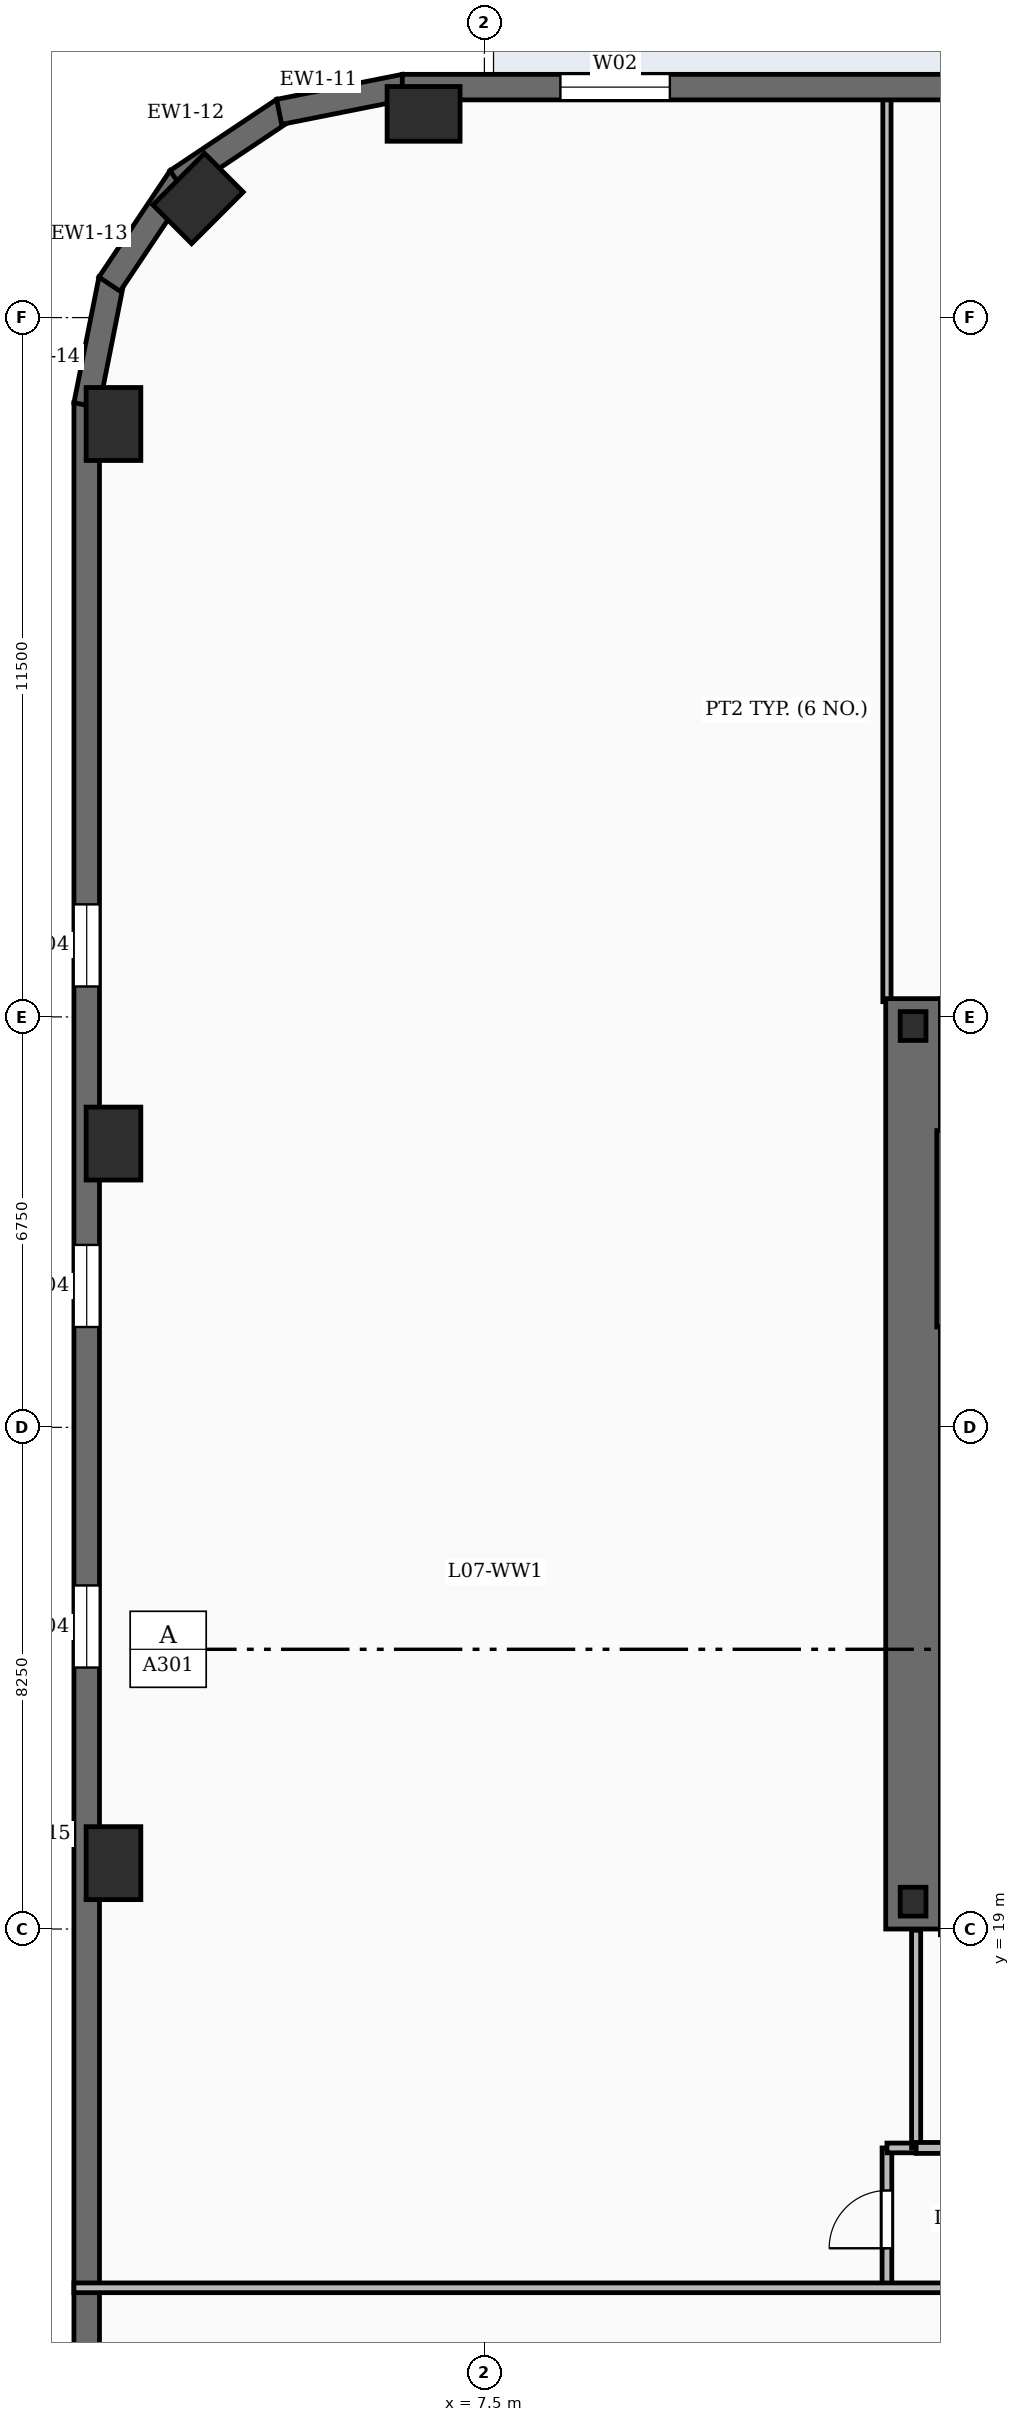
"""IFC4 building model, lengths in metres.
Left out: names, types, materials, properties, quantities, classifications, styles, units other than length and angle.
Written with IfcOpenShell. Run it as: python <this file> out.ifc"""

import sys

from ifc_helpers import new_model, si_unit, direction, frame, frame_2d, origin, origin_2d, place, context, subcontext, project, spatial, rectangle, i_section, extrude, element, fill, save


model = new_model("IFC4")
c1 = context("Model", 3, precision=1e-05, world=origin(), true_north=direction((0.0, 1.0)))
c2 = subcontext(c1, "Body", "Model", "MODEL_VIEW")
j1 = project(units=[si_unit("LENGTHUNIT", "METRE"), si_unit("PLANEANGLEUNIT", "RADIAN")], contexts=[c1])
p1 = place(None, origin())
s1 = spatial("IfcSite", under=j1, at=p1, CompositionType="ELEMENT")
p2 = place(p1, origin())
s2 = spatial("IfcBuilding", under=s1, at=p2, CompositionType="ELEMENT")
p3 = place(p2, frame((0.0, 0.0, 42.0)))
s3 = spatial("IfcBuildingStorey", under=s2, at=p3, CompositionType="ELEMENT", Elevation=42.0)
p4 = place(p3, frame((14.55, 19.0, -0.45), z_axis=(0.0, 0.0, 1.0), x_axis=(0.0, 1.0, 0.0)))
e1 = element("IfcWall", 1, at=p4, inside=s3, PredefinedType="SHEAR", context=c2, shape_type="SweptSolid", body=[
    extrude(rectangle(XDim=15.3, YDim=0.9, at=frame_2d((7.65, 0.0))), origin(), (0.0, 0.0, 1.0), 3.93),
])
for number, where, z_axis, x_axis in (
    (2, (14.55, 19.45, -0.45), (0.0, 0.0, 1.0), (1.0, 0.0, 0.0)),
    (3, (14.55, 33.85, -0.45), (0.0, 0.0, 1.0), (1.0, 0.0, 0.0)),
):
    element("IfcColumn", number, at=place(p3, frame(where, z_axis=z_axis, x_axis=x_axis)), inside=s3, PredefinedType="COLUMN", context=c2, shape_type="SweptSolid", body=[
        extrude(i_section(OverallWidth=0.424, OverallDepth=0.474, WebThickness=0.048, FlangeThickness=0.077, FilletRadius=0.02, at=origin_2d()), origin(), (0.0, 0.0, 1.0), 3.93),
    ])
for number, where, z_axis, x_axis in (
    (4, (6.5, 48.85, -0.45), (0.0, 0.0, 1.0), (1.0, 0.0, 0.0)),
    (5, (2.791, 47.459, -0.45), (0.0, 0.0, 1.0), (0.707, 0.707, 0.0)),
    (6, (1.4, 43.75, -0.45), (0.0, 0.0, 1.0), (0.0, 1.0, 0.0)),
    (7, (1.4, 31.917, -0.45), (0.0, 0.0, 1.0), (0.0, 1.0, 0.0)),
    (8, (1.4, 20.083, -0.45), (0.0, 0.0, 1.0), (0.0, 1.0, 0.0)),
):
    element("IfcColumn", number, at=place(p3, frame(where, z_axis=z_axis, x_axis=x_axis)), inside=s3, PredefinedType="COLUMN", context=c2, shape_type="SweptSolid", body=[
        extrude(rectangle(XDim=1.2, YDim=0.9, at=origin_2d()), origin(), (0.0, 0.0, 1.0), 3.93),
    ])
p5 = place(p3, frame((6.15, 49.29, 0.0), z_axis=(0.0, 0.0, 1.0), x_axis=(1.0, 0.0, 0.0)))
e9 = element("IfcWall", 9, at=p5, inside=s3, PredefinedType="SOLIDWALL", context=c2, shape_type="SweptSolid", body=[
    extrude(rectangle(XDim=61.7, YDim=0.42, at=frame_2d((30.85, 0.0))), origin(), (0.0, 0.0, 1.0), 3.48),
])
p6 = place(p5, frame((2.6, 0.0, 0.88)))
e10 = element("IfcOpeningElement", 10, at=p6, cuts=e9, PredefinedType="OPENING", context=c2, shape_type="SweptSolid", body=[
    extrude(rectangle(XDim=1.8, YDim=2.15, at=frame_2d((0.9, 1.075))), frame((0.0, 0.22, 0.0), z_axis=(0.0, -1.0, 0.0), x_axis=(1.0, 0.0, 0.0)), (0.0, 0.0, 1.0), 0.44),
])
p7 = place(p5, frame((18.8, 0.0, 0.88)))
e11 = element("IfcOpeningElement", 11, at=p7, cuts=e9, PredefinedType="OPENING", context=c2, shape_type="SweptSolid", body=[
    extrude(rectangle(XDim=1.8, YDim=2.15, at=frame_2d((0.9, 1.075))), frame((0.0, 0.22, 0.0), z_axis=(0.0, -1.0, 0.0), x_axis=(1.0, 0.0, 0.0)), (0.0, 0.0, 1.0), 0.44),
])
p8 = place(p5, frame((35.0, 0.0, 0.88)))
e12 = element("IfcOpeningElement", 12, at=p8, cuts=e9, PredefinedType="OPENING", context=c2, shape_type="SweptSolid", body=[
    extrude(rectangle(XDim=1.8, YDim=2.15, at=frame_2d((0.9, 1.075))), frame((0.0, 0.22, 0.0), z_axis=(0.0, -1.0, 0.0), x_axis=(1.0, 0.0, 0.0)), (0.0, 0.0, 1.0), 0.44),
])
p9 = place(p5, frame((40.4, 0.0, 0.88)))
e13 = element("IfcOpeningElement", 13, at=p9, cuts=e9, PredefinedType="OPENING", context=c2, shape_type="SweptSolid", body=[
    extrude(rectangle(XDim=1.8, YDim=2.15, at=frame_2d((0.9, 1.075))), frame((0.0, 0.22, 0.0), z_axis=(0.0, -1.0, 0.0), x_axis=(1.0, 0.0, 0.0)), (0.0, 0.0, 1.0), 0.44),
])
p10 = place(p5, frame((51.2, 0.0, 0.88)))
e14 = element("IfcOpeningElement", 14, at=p10, cuts=e9, PredefinedType="OPENING", context=c2, shape_type="SweptSolid", body=[
    extrude(rectangle(XDim=1.8, YDim=2.15, at=frame_2d((0.9, 1.075))), frame((0.0, 0.22, 0.0), z_axis=(0.0, -1.0, 0.0), x_axis=(1.0, 0.0, 0.0)), (0.0, 0.0, 1.0), 0.44),
])
p11 = place(p5, frame((56.6, 0.0, 0.88)))
e15 = element("IfcOpeningElement", 15, at=p11, cuts=e9, PredefinedType="OPENING", context=c2, shape_type="SweptSolid", body=[
    extrude(rectangle(XDim=1.8, YDim=2.15, at=frame_2d((0.9, 1.075))), frame((0.0, 0.22, 0.0), z_axis=(0.0, -1.0, 0.0), x_axis=(1.0, 0.0, 0.0)), (0.0, 0.0, 1.0), 0.44),
])
for number, where, z_axis, x_axis in (
    (16, (4.125, 48.883, 0.0), (0.0, 0.0, 1.0), (0.981, 0.195, 0.0)),
    (17, (2.448, 47.744, 0.0), (0.0, 0.0, 1.0), (0.832, 0.556, 0.0)),
    (18, (1.336, 46.05, 0.0), (0.0, 0.0, 1.0), (0.556, 0.832, 0.0)),
    (19, (0.956, 44.059, 0.0), (0.0, 0.0, 1.0), (0.195, 0.981, 0.0)),
):
    element("IfcWall", number, at=place(p3, frame(where, z_axis=z_axis, x_axis=x_axis)), inside=s3, PredefinedType="SOLIDWALL", context=c2, shape_type="SweptSolid", body=[
        extrude(rectangle(XDim=2.107, YDim=0.42, at=frame_2d((1.053, 0.0))), origin(), (0.0, 0.0, 1.0), 3.48),
    ])
p12 = place(p3, frame((0.96, 7.9, 0.0), z_axis=(0.0, 0.0, 1.0), x_axis=(0.0, 1.0, 0.0)))
e20 = element("IfcWall", 20, at=p12, inside=s3, PredefinedType="SOLIDWALL", context=c2, shape_type="SweptSolid", body=[
    extrude(rectangle(XDim=36.2, YDim=0.42, at=frame_2d((18.1, 0.0))), origin(), (0.0, 0.0, 1.0), 3.48),
])
p13 = place(p12, frame((15.4, 0.0, 0.88)))
e21 = element("IfcOpeningElement", 21, at=p13, cuts=e20, PredefinedType="OPENING", context=c2, shape_type="SweptSolid", body=[
    extrude(rectangle(XDim=1.35, YDim=2.2, at=frame_2d((0.675, 1.1))), frame((0.0, 0.22, 0.0), z_axis=(0.0, -1.0, 0.0), x_axis=(1.0, 0.0, 0.0)), (0.0, 0.0, 1.0), 0.44),
])
p14 = place(p12, frame((21.0, 0.0, 0.88)))
e22 = element("IfcOpeningElement", 22, at=p14, cuts=e20, PredefinedType="OPENING", context=c2, shape_type="SweptSolid", body=[
    extrude(rectangle(XDim=1.35, YDim=2.2, at=frame_2d((0.675, 1.1))), frame((0.0, 0.22, 0.0), z_axis=(0.0, -1.0, 0.0), x_axis=(1.0, 0.0, 0.0)), (0.0, 0.0, 1.0), 0.44),
])
p15 = place(p12, frame((26.6, 0.0, 0.88)))
e23 = element("IfcOpeningElement", 23, at=p15, cuts=e20, PredefinedType="OPENING", context=c2, shape_type="SweptSolid", body=[
    extrude(rectangle(XDim=1.35, YDim=2.2, at=frame_2d((0.675, 1.1))), frame((0.0, 0.22, 0.0), z_axis=(0.0, -1.0, 0.0), x_axis=(1.0, 0.0, 0.0)), (0.0, 0.0, 1.0), 0.44),
])
p16 = place(p3, frame((15.06, 28.9, 0.0), z_axis=(0.0, 0.0, 1.0), x_axis=(0.0, 1.0, 0.0)))
e24 = element("IfcWall", 24, at=p16, inside=s3, PredefinedType="SOLIDWALL", context=c2, shape_type="SweptSolid", body=[
    extrude(rectangle(XDim=3.23, YDim=0.24, at=frame_2d((1.615, 0.0))), origin(), (0.0, 0.0, 1.0), 3.48),
])
for number, where, z_axis, x_axis in (
    (25, (15.0, 20.905, 0.0), (0.0, 0.0, 1.0), (1.0, 0.0, 0.0)),
    (26, (15.0, 18.995, 0.0), (0.0, 0.0, 1.0), (1.0, 0.0, 0.0)),
):
    element("IfcWall", number, at=place(p3, frame(where, z_axis=z_axis, x_axis=x_axis)), inside=s3, PredefinedType="SOLIDWALL", context=c2, shape_type="SweptSolid", body=[
        extrude(rectangle(XDim=3.3, YDim=0.18, at=frame_2d((1.65, 0.0))), origin(), (0.0, 0.0, 1.0), 3.48),
    ])
p17 = place(p3, frame((14.6, 15.4, 0.0), z_axis=(0.0, 0.0, 1.0), x_axis=(1.0, 0.0, 0.0)))
e27 = element("IfcWall", 27, at=p17, inside=s3, PredefinedType="PARTITIONING", context=c2, shape_type="SweptSolid", body=[
    extrude(rectangle(XDim=9.9, YDim=0.18, at=frame_2d((4.95, 0.0))), origin(), (0.0, 0.0, 1.0), 2.54),
])
p18 = place(p17, frame((0.74, 0.0, 0.0)))
e28 = element("IfcOpeningElement", 28, at=p18, cuts=e27, PredefinedType="OPENING", context=c2, shape_type="SweptSolid", body=[
    extrude(rectangle(XDim=0.92, YDim=2.1, at=frame_2d((0.46, 1.05))), frame((0.0, 0.1, 0.0), z_axis=(0.0, -1.0, 0.0), x_axis=(1.0, 0.0, 0.0)), (0.0, 0.0, 1.0), 0.2),
])
p19 = place(p17, frame((3.19, 0.0, 0.0)))
e29 = element("IfcOpeningElement", 29, at=p19, cuts=e27, PredefinedType="OPENING", context=c2, shape_type="SweptSolid", body=[
    extrude(rectangle(XDim=0.92, YDim=2.1, at=frame_2d((0.46, 1.05))), frame((0.0, 0.1, 0.0), z_axis=(0.0, -1.0, 0.0), x_axis=(1.0, 0.0, 0.0)), (0.0, 0.0, 1.0), 0.2),
])
p20 = place(p17, frame((5.69, 0.0, 0.0)))
e30 = element("IfcOpeningElement", 30, at=p20, cuts=e27, PredefinedType="OPENING", context=c2, shape_type="SweptSolid", body=[
    extrude(rectangle(XDim=0.92, YDim=2.1, at=frame_2d((0.46, 1.05))), frame((0.0, 0.1, 0.0), z_axis=(0.0, -1.0, 0.0), x_axis=(1.0, 0.0, 0.0)), (0.0, 0.0, 1.0), 0.2),
])
p21 = place(p17, frame((8.19, 0.0, 0.0)))
e31 = element("IfcOpeningElement", 31, at=p21, cuts=e27, PredefinedType="OPENING", context=c2, shape_type="SweptSolid", body=[
    extrude(rectangle(XDim=0.92, YDim=2.1, at=frame_2d((0.46, 1.05))), frame((0.0, 0.1, 0.0), z_axis=(0.0, -1.0, 0.0), x_axis=(1.0, 0.0, 0.0)), (0.0, 0.0, 1.0), 0.2),
])
p22 = place(p3, frame((14.6, 15.4, 0.0), z_axis=(0.0, 0.0, 1.0), x_axis=(0.0, 1.0, 0.0)))
e32 = element("IfcWall", 32, at=p22, inside=s3, PredefinedType="PARTITIONING", context=c2, shape_type="SweptSolid", body=[
    extrude(rectangle(XDim=3.58, YDim=0.15, at=frame_2d((1.79, 0.0))), origin(), (0.0, 0.0, 1.0), 2.54),
])
p23 = place(p3, frame((0.75, 13.1, 0.0), z_axis=(0.0, 0.0, 1.0), x_axis=(1.0, 0.0, 0.0)))
e33 = element("IfcWall", 33, at=p23, inside=s3, PredefinedType="PARTITIONING", context=c2, shape_type="SweptSolid", body=[
    extrude(rectangle(XDim=72.5, YDim=0.16, at=frame_2d((36.25, 0.0))), origin(), (0.0, 0.0, 1.0), 2.54),
])
p24 = place(p23, frame((21.275, 0.0, 0.0)))
e34 = element("IfcOpeningElement", 34, at=p24, cuts=e33, PredefinedType="OPENING", context=c2, shape_type="SweptSolid", body=[
    extrude(rectangle(XDim=0.95, YDim=2.15, at=frame_2d((0.475, 1.075))), frame((0.0, 0.09, 0.0), z_axis=(0.0, -1.0, 0.0), x_axis=(1.0, 0.0, 0.0)), (0.0, 0.0, 1.0), 0.18),
])
p25 = place(p23, frame((36.275, 0.0, 0.0)))
e35 = element("IfcOpeningElement", 35, at=p25, cuts=e33, PredefinedType="OPENING", context=c2, shape_type="SweptSolid", body=[
    extrude(rectangle(XDim=0.95, YDim=2.15, at=frame_2d((0.475, 1.075))), frame((0.0, 0.09, 0.0), z_axis=(0.0, -1.0, 0.0), x_axis=(1.0, 0.0, 0.0)), (0.0, 0.0, 1.0), 0.18),
])
p26 = place(p23, frame((47.475, 0.0, 0.0)))
e36 = element("IfcOpeningElement", 36, at=p26, cuts=e33, PredefinedType="OPENING", context=c2, shape_type="SweptSolid", body=[
    extrude(rectangle(XDim=0.95, YDim=2.15, at=frame_2d((0.475, 1.075))), frame((0.0, 0.09, 0.0), z_axis=(0.0, -1.0, 0.0), x_axis=(1.0, 0.0, 0.0)), (0.0, 0.0, 1.0), 0.18),
])
p27 = place(p3, frame((14.12, 34.25, 0.0), z_axis=(0.0, 0.0, 1.0), x_axis=(0.0, 1.0, 0.0)))
e37 = element("IfcWall", 37, at=p27, inside=s3, PredefinedType="PARTITIONING", context=c2, shape_type="SweptSolid", body=[
    extrude(rectangle(XDim=15.01, YDim=0.135, at=frame_2d((7.505, 0.0))), origin(), (0.0, 0.0, 1.0), 2.54),
])
p28 = place(p3, frame((14.12, 13.1, 0.0), z_axis=(0.0, 0.0, 1.0), x_axis=(0.0, 1.0, 0.0)))
e38 = element("IfcWall", 38, at=p28, inside=s3, PredefinedType="PARTITIONING", context=c2, shape_type="SweptSolid", body=[
    extrude(rectangle(XDim=2.3, YDim=0.16, at=frame_2d((1.15, 0.0))), origin(), (0.0, 0.0, 1.0), 2.54),
])
p29 = place(p28, frame((0.65, 0.0, 0.0)))
e39 = element("IfcOpeningElement", 39, at=p29, cuts=e38, PredefinedType="OPENING", context=c2, shape_type="SweptSolid", body=[
    extrude(rectangle(XDim=0.95, YDim=2.15, at=frame_2d((0.475, 1.075))), frame((0.0, 0.09, 0.0), z_axis=(0.0, -1.0, 0.0), x_axis=(1.0, 0.0, 0.0)), (0.0, 0.0, 1.0), 0.18),
])
p30 = place(p3, frame((14.12, 15.4, 0.0), z_axis=(0.0, 0.0, 1.0), x_axis=(1.0, 0.0, 0.0)))
e40 = element("IfcWall", 40, at=p30, inside=s3, PredefinedType="PARTITIONING", context=c2, shape_type="SweptSolid", body=[
    extrude(rectangle(XDim=0.5, YDim=0.16, at=frame_2d((0.25, 0.0))), origin(), (0.0, 0.0, 1.0), 2.54),
])
p31 = place(p6, origin())
e41 = element("IfcWindow", 41, at=p31, inside=s3, PartitioningType="DOUBLE_PANEL_VERTICAL", PredefinedType="WINDOW", context=c2, shape_type="SweptSolid", body=[
    extrude(rectangle(XDim=1.8, YDim=2.15, at=frame_2d((0.9, 1.075))), frame((0.0, 0.03, 0.0), z_axis=(0.0, -1.0, 0.0), x_axis=(1.0, 0.0, 0.0)), (0.0, 0.0, 1.0), 0.06),
])
fill(e10, e41)
p32 = place(p13, origin())
e42 = element("IfcWindow", 42, at=p32, inside=s3, PartitioningType="SINGLE_PANEL", PredefinedType="WINDOW", context=c2, shape_type="SweptSolid", body=[
    extrude(rectangle(XDim=1.35, YDim=2.2, at=frame_2d((0.675, 1.1))), frame((0.0, 0.03, 0.0), z_axis=(0.0, -1.0, 0.0), x_axis=(1.0, 0.0, 0.0)), (0.0, 0.0, 1.0), 0.06),
])
fill(e21, e42)
p33 = place(p14, origin())
e43 = element("IfcWindow", 43, at=p33, inside=s3, PartitioningType="SINGLE_PANEL", PredefinedType="WINDOW", context=c2, shape_type="SweptSolid", body=[
    extrude(rectangle(XDim=1.35, YDim=2.2, at=frame_2d((0.675, 1.1))), frame((0.0, 0.03, 0.0), z_axis=(0.0, -1.0, 0.0), x_axis=(1.0, 0.0, 0.0)), (0.0, 0.0, 1.0), 0.06),
])
fill(e22, e43)
p34 = place(p15, origin())
e44 = element("IfcWindow", 44, at=p34, inside=s3, PartitioningType="SINGLE_PANEL", PredefinedType="WINDOW", context=c2, shape_type="SweptSolid", body=[
    extrude(rectangle(XDim=1.35, YDim=2.2, at=frame_2d((0.675, 1.1))), frame((0.0, 0.03, 0.0), z_axis=(0.0, -1.0, 0.0), x_axis=(1.0, 0.0, 0.0)), (0.0, 0.0, 1.0), 0.06),
])
fill(e23, e44)
p35 = place(p29, origin())
e45 = element("IfcDoor", 45, at=p35, inside=s3, OperationType="SINGLE_SWING_LEFT", PredefinedType="DOOR", context=c2, shape_type="SweptSolid", body=[
    extrude(rectangle(XDim=0.95, YDim=2.15, at=frame_2d((0.475, 1.075))), frame((0.0, 0.025, 0.0), z_axis=(0.0, -1.0, 0.0), x_axis=(1.0, 0.0, 0.0)), (0.0, 0.0, 1.0), 0.05),
])
fill(e39, e45)
save(model, sys.argv[1])
